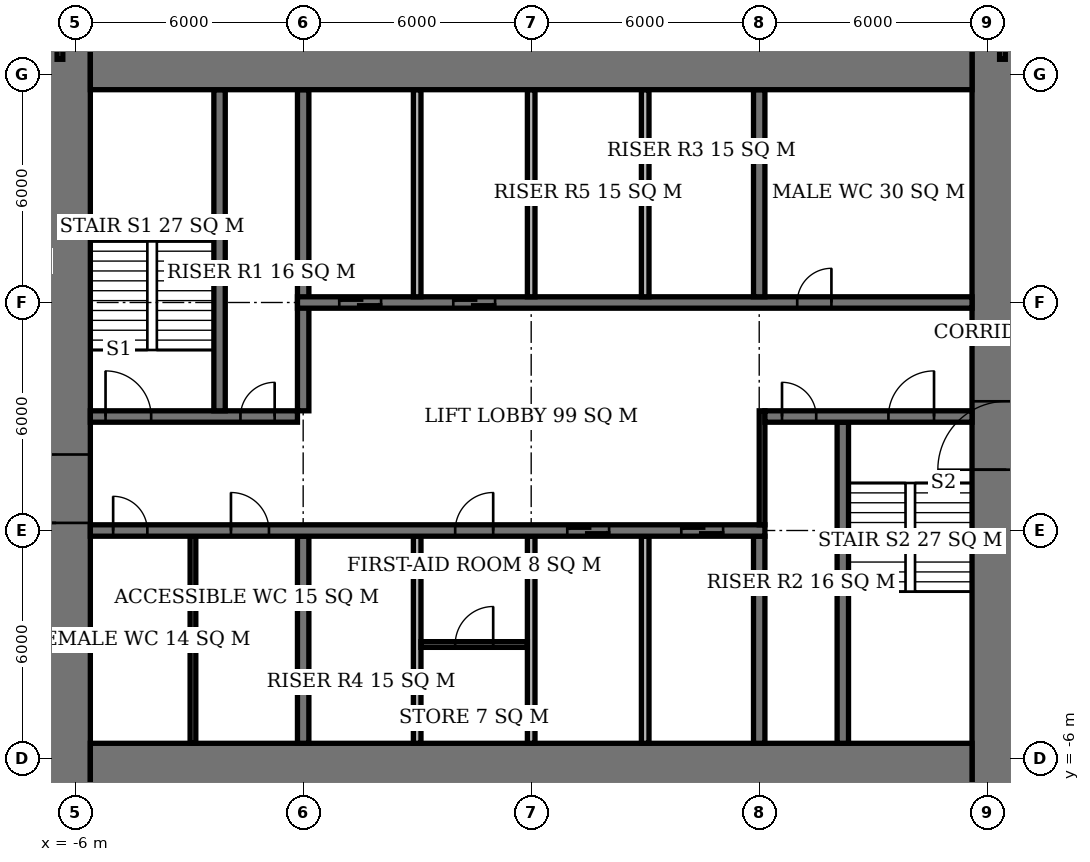
"""IFC4 building model, lengths in metres.
Left out: names, types, materials, properties, quantities, classifications, styles, units other than length and angle.
Written with IfcOpenShell. Run it as: python <this file> out.ifc"""

import sys

from ifc_helpers import new_model, si_unit, direction, frame, frame_2d, origin, place, context, subcontext, project, spatial, rectangle, extrude, element, fill, save


model = new_model("IFC4")
c1 = context("Model", 3, precision=1e-05, world=origin(), true_north=direction((0.0, 1.0)))
c2 = subcontext(c1, "Body", "Model", "MODEL_VIEW")
j1 = project(units=[si_unit("LENGTHUNIT", "METRE"), si_unit("PLANEANGLEUNIT", "RADIAN")], contexts=[c1])
p1 = place(None, origin())
s1 = spatial("IfcSite", under=j1, at=p1, CompositionType="ELEMENT")
p2 = place(p1, origin())
s2 = spatial("IfcBuilding", under=s1, at=p2, CompositionType="ELEMENT")
p3 = place(p2, frame((0.0, 0.0, 252.8)))
s3 = spatial("IfcBuildingStorey", under=s2, at=p3, CompositionType="ELEMENT", Elevation=252.8)
for number, where, z_axis, x_axis in (
    (1, (-5.6, -6.6, 0.0), (0.0, 0.0, 1.0), (1.0, 0.0, 0.0)),
    (2, (-5.6, 12.6, 0.0), (0.0, 0.0, 1.0), (1.0, 0.0, 0.0)),
):
    element("IfcWall", number, at=place(p3, frame(where, z_axis=z_axis, x_axis=x_axis)), inside=s3, PredefinedType="SHEAR", context=c2, shape_type="SweptSolid", body=[
        extrude(rectangle(XDim=23.2, YDim=2.0, at=frame_2d((11.6, 0.0))), origin(), (0.0, 0.0, 1.0), 3.9),
    ])
p4 = place(p3, frame((-6.5, -7.6, 0.0), z_axis=(0.0, 0.0, 1.0), x_axis=(0.0, 1.0, 0.0)))
e3 = element("IfcWall", 3, at=p4, inside=s3, PredefinedType="SHEAR", context=c2, shape_type="SweptSolid", body=[
    extrude(rectangle(XDim=21.2, YDim=1.8, at=frame_2d((10.6, 0.0))), origin(), (0.0, 0.0, 1.0), 3.9),
])
p5 = place(p4, frame((7.8, 0.0, 0.0)))
e4 = element("IfcOpeningElement", 4, at=p5, cuts=e3, PredefinedType="OPENING", context=c2, shape_type="SweptSolid", body=[
    extrude(rectangle(XDim=1.8, YDim=2.4, at=frame_2d((0.9, 1.2))), frame((0.0, 0.91, 0.0), z_axis=(0.0, -1.0, 0.0), x_axis=(1.0, 0.0, 0.0)), (0.0, 0.0, 1.0), 1.82),
])
p6 = place(p3, frame((18.5, -7.6, 0.0), z_axis=(0.0, 0.0, 1.0), x_axis=(0.0, 1.0, 0.0)))
e5 = element("IfcWall", 5, at=p6, inside=s3, PredefinedType="SHEAR", context=c2, shape_type="SweptSolid", body=[
    extrude(rectangle(XDim=21.2, YDim=1.8, at=frame_2d((10.6, 0.0))), origin(), (0.0, 0.0, 1.0), 3.9),
])
p7 = place(p6, frame((9.2, 0.0, 0.0)))
e6 = element("IfcOpeningElement", 6, at=p7, cuts=e5, PredefinedType="OPENING", context=c2, shape_type="SweptSolid", body=[
    extrude(rectangle(XDim=1.8, YDim=2.4, at=frame_2d((0.9, 1.2))), frame((0.0, 0.91, 0.0), z_axis=(0.0, -1.0, 0.0), x_axis=(1.0, 0.0, 0.0)), (0.0, 0.0, 1.0), 1.82),
])
p8 = place(p3, frame((-5.6, 0.0, 0.0), z_axis=(0.0, 0.0, 1.0), x_axis=(1.0, 0.0, 0.0)))
e7 = element("IfcWall", 7, at=p8, inside=s3, PredefinedType="SHEAR", context=c2, shape_type="SweptSolid", body=[
    extrude(rectangle(XDim=17.75, YDim=0.3, at=frame_2d((8.875, 0.0))), origin(), (0.0, 0.0, 1.0), 3.9),
])
p9 = place(p8, frame((0.6, 0.0, 0.0)))
e8 = element("IfcOpeningElement", 8, at=p9, cuts=e7, PredefinedType="OPENING", context=c2, shape_type="SweptSolid", body=[
    extrude(rectangle(XDim=0.9, YDim=2.1, at=frame_2d((0.45, 1.05))), frame((0.0, 0.16, 0.0), z_axis=(0.0, -1.0, 0.0), x_axis=(1.0, 0.0, 0.0)), (0.0, 0.0, 1.0), 0.32),
])
p10 = place(p8, frame((3.7, 0.0, 0.0)))
e9 = element("IfcOpeningElement", 9, at=p10, cuts=e7, PredefinedType="OPENING", context=c2, shape_type="SweptSolid", body=[
    extrude(rectangle(XDim=1.0, YDim=2.1, at=frame_2d((0.5, 1.05))), frame((0.0, 0.16, 0.0), z_axis=(0.0, -1.0, 0.0), x_axis=(1.0, 0.0, 0.0)), (0.0, 0.0, 1.0), 0.32),
])
p11 = place(p8, frame((9.6, 0.0, 0.0)))
e10 = element("IfcOpeningElement", 10, at=p11, cuts=e7, PredefinedType="OPENING", context=c2, shape_type="SweptSolid", body=[
    extrude(rectangle(XDim=1.0, YDim=2.1, at=frame_2d((0.5, 1.05))), frame((0.0, 0.16, 0.0), z_axis=(0.0, -1.0, 0.0), x_axis=(1.0, 0.0, 0.0)), (0.0, 0.0, 1.0), 0.32),
])
p12 = place(p8, frame((12.55, 0.0, 0.0)))
e11 = element("IfcOpeningElement", 11, at=p12, cuts=e7, PredefinedType="OPENING", context=c2, shape_type="SweptSolid", body=[
    extrude(rectangle(XDim=1.1, YDim=2.1, at=frame_2d((0.55, 1.05))), frame((0.0, 0.16, 0.0), z_axis=(0.0, -1.0, 0.0), x_axis=(1.0, 0.0, 0.0)), (0.0, 0.0, 1.0), 0.32),
])
p13 = place(p8, frame((15.55, 0.0, 0.0)))
e12 = element("IfcOpeningElement", 12, at=p13, cuts=e7, PredefinedType="OPENING", context=c2, shape_type="SweptSolid", body=[
    extrude(rectangle(XDim=1.1, YDim=2.1, at=frame_2d((0.55, 1.05))), frame((0.0, 0.16, 0.0), z_axis=(0.0, -1.0, 0.0), x_axis=(1.0, 0.0, 0.0)), (0.0, 0.0, 1.0), 0.32),
])
p14 = place(p3, frame((-5.6, 3.0, 0.0), z_axis=(0.0, 0.0, 1.0), x_axis=(1.0, 0.0, 0.0)))
e13 = element("IfcWall", 13, at=p14, inside=s3, PredefinedType="SHEAR", context=c2, shape_type="SweptSolid", body=[
    extrude(rectangle(XDim=5.45, YDim=0.3, at=frame_2d((2.725, 0.0))), origin(), (0.0, 0.0, 1.0), 3.9),
])
p15 = place(p14, frame((0.4, 0.0, 0.0)))
e14 = element("IfcOpeningElement", 14, at=p15, cuts=e13, PredefinedType="OPENING", context=c2, shape_type="SweptSolid", body=[
    extrude(rectangle(XDim=1.2, YDim=2.1, at=frame_2d((0.6, 1.05))), frame((0.0, 0.16, 0.0), z_axis=(0.0, -1.0, 0.0), x_axis=(1.0, 0.0, 0.0)), (0.0, 0.0, 1.0), 0.32),
])
p16 = place(p14, frame((3.95, 0.0, 0.0)))
e15 = element("IfcOpeningElement", 15, at=p16, cuts=e13, PredefinedType="OPENING", context=c2, shape_type="SweptSolid", body=[
    extrude(rectangle(XDim=0.9, YDim=2.1, at=frame_2d((0.45, 1.05))), frame((0.0, 0.16, 0.0), z_axis=(0.0, -1.0, 0.0), x_axis=(1.0, 0.0, 0.0)), (0.0, 0.0, 1.0), 0.32),
])
p17 = place(p3, frame((12.15, 3.0, 0.0), z_axis=(0.0, 0.0, 1.0), x_axis=(1.0, 0.0, 0.0)))
e16 = element("IfcWall", 16, at=p17, inside=s3, PredefinedType="SHEAR", context=c2, shape_type="SweptSolid", body=[
    extrude(rectangle(XDim=5.45, YDim=0.3, at=frame_2d((2.725, 0.0))), origin(), (0.0, 0.0, 1.0), 3.9),
])
p18 = place(p17, frame((3.25, 0.0, 0.0)))
e17 = element("IfcOpeningElement", 17, at=p18, cuts=e16, PredefinedType="OPENING", context=c2, shape_type="SweptSolid", body=[
    extrude(rectangle(XDim=1.2, YDim=2.1, at=frame_2d((0.6, 1.05))), frame((0.0, 0.16, 0.0), z_axis=(0.0, -1.0, 0.0), x_axis=(1.0, 0.0, 0.0)), (0.0, 0.0, 1.0), 0.32),
])
p19 = place(p17, frame((0.45, 0.0, 0.0)))
e18 = element("IfcOpeningElement", 18, at=p19, cuts=e16, PredefinedType="OPENING", context=c2, shape_type="SweptSolid", body=[
    extrude(rectangle(XDim=0.9, YDim=2.1, at=frame_2d((0.45, 1.05))), frame((0.0, 0.16, 0.0), z_axis=(0.0, -1.0, 0.0), x_axis=(1.0, 0.0, 0.0)), (0.0, 0.0, 1.0), 0.32),
])
p20 = place(p3, frame((-0.15, 6.0, 0.0), z_axis=(0.0, 0.0, 1.0), x_axis=(1.0, 0.0, 0.0)))
e19 = element("IfcWall", 19, at=p20, inside=s3, PredefinedType="SHEAR", context=c2, shape_type="SweptSolid", body=[
    extrude(rectangle(XDim=17.75, YDim=0.3, at=frame_2d((8.875, 0.0))), origin(), (0.0, 0.0, 1.0), 3.9),
])
p21 = place(p20, frame((13.15, 0.0, 0.0)))
e20 = element("IfcOpeningElement", 20, at=p21, cuts=e19, PredefinedType="OPENING", context=c2, shape_type="SweptSolid", body=[
    extrude(rectangle(XDim=0.9, YDim=2.1, at=frame_2d((0.45, 1.05))), frame((0.0, 0.16, 0.0), z_axis=(0.0, -1.0, 0.0), x_axis=(1.0, 0.0, 0.0)), (0.0, 0.0, 1.0), 0.32),
])
p22 = place(p20, frame((1.1, 0.0, 0.0)))
e21 = element("IfcOpeningElement", 21, at=p22, cuts=e19, PredefinedType="OPENING", context=c2, shape_type="SweptSolid", body=[
    extrude(rectangle(XDim=1.1, YDim=2.1, at=frame_2d((0.55, 1.05))), frame((0.0, 0.16, 0.0), z_axis=(0.0, -1.0, 0.0), x_axis=(1.0, 0.0, 0.0)), (0.0, 0.0, 1.0), 0.32),
])
p23 = place(p20, frame((4.1, 0.0, 0.0)))
e22 = element("IfcOpeningElement", 22, at=p23, cuts=e19, PredefinedType="OPENING", context=c2, shape_type="SweptSolid", body=[
    extrude(rectangle(XDim=1.1, YDim=2.1, at=frame_2d((0.55, 1.05))), frame((0.0, 0.16, 0.0), z_axis=(0.0, -1.0, 0.0), x_axis=(1.0, 0.0, 0.0)), (0.0, 0.0, 1.0), 0.32),
])
p24 = place(p3, frame((0.0, -5.6, 0.0), z_axis=(0.0, 0.0, 1.0), x_axis=(0.0, 1.0, 0.0)))
e23 = element("IfcWall", 23, at=p24, inside=s3, PredefinedType="SHEAR", context=c2, shape_type="SweptSolid", body=[
    extrude(rectangle(XDim=5.45, YDim=0.3, at=frame_2d((2.725, 0.0))), origin(), (0.0, 0.0, 1.0), 3.9),
])
p25 = place(p3, frame((0.0, 3.15, 0.0), z_axis=(0.0, 0.0, 1.0), x_axis=(0.0, 1.0, 0.0)))
e24 = element("IfcWall", 24, at=p25, inside=s3, PredefinedType="SHEAR", context=c2, shape_type="SweptSolid", body=[
    extrude(rectangle(XDim=8.45, YDim=0.3, at=frame_2d((4.225, 0.0))), origin(), (0.0, 0.0, 1.0), 3.9),
])
for number, where, z_axis, x_axis in (
    (25, (12.0, -5.6, 0.0), (0.0, 0.0, 1.0), (0.0, 1.0, 0.0)),
    (26, (12.0, 6.15, 0.0), (0.0, 0.0, 1.0), (0.0, 1.0, 0.0)),
):
    element("IfcWall", number, at=place(p3, frame(where, z_axis=z_axis, x_axis=x_axis)), inside=s3, PredefinedType="SHEAR", context=c2, shape_type="SweptSolid", body=[
        extrude(rectangle(XDim=5.45, YDim=0.3, at=frame_2d((2.725, 0.0))), origin(), (0.0, 0.0, 1.0), 3.9),
    ])
for number, where, z_axis, x_axis in (
    (27, (-2.2, 3.15, 0.0), (0.0, 0.0, 1.0), (0.0, 1.0, 0.0)),
    (28, (14.2, -5.6, 0.0), (0.0, 0.0, 1.0), (0.0, 1.0, 0.0)),
):
    element("IfcWall", number, at=place(p3, frame(where, z_axis=z_axis, x_axis=x_axis)), inside=s3, PredefinedType="SHEAR", context=c2, shape_type="SweptSolid", body=[
        extrude(rectangle(XDim=8.45, YDim=0.3, at=frame_2d((4.225, 0.0))), origin(), (0.0, 0.0, 1.0), 3.9),
    ])
for number, where, z_axis, x_axis in (
    (29, (3.0, 6.15, 0.0), (0.0, 0.0, 1.0), (0.0, 1.0, 0.0)),
    (30, (6.0, 6.15, 0.0), (0.0, 0.0, 1.0), (0.0, 1.0, 0.0)),
    (31, (9.0, 6.15, 0.0), (0.0, 0.0, 1.0), (0.0, 1.0, 0.0)),
    (32, (3.0, -5.6, 0.0), (0.0, 0.0, 1.0), (0.0, 1.0, 0.0)),
    (33, (6.0, -5.6, 0.0), (0.0, 0.0, 1.0), (0.0, 1.0, 0.0)),
    (34, (9.0, -5.6, 0.0), (0.0, 0.0, 1.0), (0.0, 1.0, 0.0)),
):
    element("IfcWall", number, at=place(p3, frame(where, z_axis=z_axis, x_axis=x_axis)), inside=s3, PredefinedType="SOLIDWALL", context=c2, shape_type="SweptSolid", body=[
        extrude(rectangle(XDim=5.45, YDim=0.2, at=frame_2d((2.725, 0.0))), origin(), (0.0, 0.0, 1.0), 3.9),
    ])
p26 = place(p3, frame((-2.9, -5.6, 0.0), z_axis=(0.0, 0.0, 1.0), x_axis=(0.0, 1.0, 0.0)))
e35 = element("IfcWall", 35, at=p26, inside=s3, PredefinedType="PLUMBINGWALL", context=c2, shape_type="SweptSolid", body=[
    extrude(rectangle(XDim=5.45, YDim=0.15, at=frame_2d((2.725, 0.0))), origin(), (0.0, 0.0, 1.0), 3.65),
])
p27 = place(p3, frame((3.1, -3.0, 0.0), z_axis=(0.0, 0.0, 1.0), x_axis=(1.0, 0.0, 0.0)))
e36 = element("IfcWall", 36, at=p27, inside=s3, PredefinedType="PARTITIONING", context=c2, shape_type="SweptSolid", body=[
    extrude(rectangle(XDim=2.8, YDim=0.15, at=frame_2d((1.4, 0.0))), origin(), (0.0, 0.0, 1.0), 3.65),
])
p28 = place(p27, frame((0.9, 0.0, 0.0)))
e37 = element("IfcOpeningElement", 37, at=p28, cuts=e36, PredefinedType="OPENING", context=c2, shape_type="SweptSolid", body=[
    extrude(rectangle(XDim=1.0, YDim=2.1, at=frame_2d((0.5, 1.05))), frame((0.0, 0.085, 0.0), z_axis=(0.0, -1.0, 0.0), x_axis=(1.0, 0.0, 0.0)), (0.0, 0.0, 1.0), 0.17),
])
p29 = place(p3, frame((-6.4, 12.4, 0.0), z_axis=(0.0, 0.0, 1.0), x_axis=(0.0, 1.0, 0.0)))
e38 = element("IfcWall", 38, at=p29, inside=s3, PredefinedType="PARTITIONING", context=c2, shape_type="SweptSolid", body=[
    extrude(rectangle(XDim=1.2, YDim=0.15, at=frame_2d((0.6, 0.0))), origin(), (0.0, 0.0, 1.0), 3.65),
])
p30 = place(p3, frame((13.5, 12.4, 0.0), z_axis=(0.0, 0.0, 1.0), x_axis=(0.0, 1.0, 0.0)))
e39 = element("IfcWall", 39, at=p30, inside=s3, PredefinedType="PARTITIONING", context=c2, shape_type="SweptSolid", body=[
    extrude(rectangle(XDim=12.975, YDim=0.15, at=frame_2d((6.488, 0.0))), origin(), (0.0, 0.0, 1.0), 3.65),
])
p31 = place(p3, frame((18.4, 12.4, 0.0), z_axis=(0.0, 0.0, 1.0), x_axis=(0.0, 1.0, 0.0)))
e40 = element("IfcWall", 40, at=p31, inside=s3, PredefinedType="PARTITIONING", context=c2, shape_type="SweptSolid", body=[
    extrude(rectangle(XDim=1.2, YDim=0.15, at=frame_2d((0.6, 0.0))), origin(), (0.0, 0.0, 1.0), 3.65),
])
p32 = place(p3, frame((12.075, 0.15, 0.0), z_axis=(0.0, 0.0, 1.0), x_axis=(0.0, 1.0, 0.0)))
e41 = element("IfcWall", 41, at=p32, inside=s3, PredefinedType="PARTITIONING", context=c2, shape_type="SweptSolid", body=[
    extrude(rectangle(XDim=3.0, YDim=0.15, at=frame_2d((1.5, 0.0))), origin(), (0.0, 0.0, 1.0), 3.65),
])
p33 = place(p5, origin())
e42 = element("IfcDoor", 42, at=p33, inside=s3, OperationType="DOUBLE_DOOR_SINGLE_SWING", PredefinedType="DOOR", context=c2, shape_type="SweptSolid", body=[
    extrude(rectangle(XDim=1.8, YDim=2.4, at=frame_2d((0.9, 1.2))), frame((0.0, 0.025, 0.0), z_axis=(0.0, -1.0, 0.0), x_axis=(1.0, 0.0, 0.0)), (0.0, 0.0, 1.0), 0.05),
])
fill(e4, e42)
p34 = place(p7, origin())
e43 = element("IfcDoor", 43, at=p34, inside=s3, OperationType="DOUBLE_DOOR_SINGLE_SWING", PredefinedType="DOOR", context=c2, shape_type="SweptSolid", body=[
    extrude(rectangle(XDim=1.8, YDim=2.4, at=frame_2d((0.9, 1.2))), frame((0.0, 0.025, 0.0), z_axis=(0.0, -1.0, 0.0), x_axis=(1.0, 0.0, 0.0)), (0.0, 0.0, 1.0), 0.05),
])
fill(e6, e43)
p35 = place(p15, origin())
e44 = element("IfcDoor", 44, at=p35, inside=s3, OperationType="SINGLE_SWING_LEFT", PredefinedType="DOOR", context=c2, shape_type="SweptSolid", body=[
    extrude(rectangle(XDim=1.2, YDim=2.1, at=frame_2d((0.6, 1.05))), frame((0.0, 0.025, 0.0), z_axis=(0.0, -1.0, 0.0), x_axis=(1.0, 0.0, 0.0)), (0.0, 0.0, 1.0), 0.05),
])
fill(e14, e44)
p36 = place(p16, origin())
e45 = element("IfcDoor", 45, at=p36, inside=s3, OperationType="SINGLE_SWING_RIGHT", PredefinedType="DOOR", context=c2, shape_type="SweptSolid", body=[
    extrude(rectangle(XDim=0.9, YDim=2.1, at=frame_2d((0.45, 1.05))), frame((0.0, 0.025, 0.0), z_axis=(0.0, -1.0, 0.0), x_axis=(1.0, 0.0, 0.0)), (0.0, 0.0, 1.0), 0.05),
])
fill(e15, e45)
p37 = place(p18, origin())
e46 = element("IfcDoor", 46, at=p37, inside=s3, OperationType="SINGLE_SWING_RIGHT", PredefinedType="DOOR", context=c2, shape_type="SweptSolid", body=[
    extrude(rectangle(XDim=1.2, YDim=2.1, at=frame_2d((0.6, 1.05))), frame((0.0, 0.025, 0.0), z_axis=(0.0, -1.0, 0.0), x_axis=(1.0, 0.0, 0.0)), (0.0, 0.0, 1.0), 0.05),
])
fill(e17, e46)
p38 = place(p19, origin())
e47 = element("IfcDoor", 47, at=p38, inside=s3, OperationType="SINGLE_SWING_LEFT", PredefinedType="DOOR", context=c2, shape_type="SweptSolid", body=[
    extrude(rectangle(XDim=0.9, YDim=2.1, at=frame_2d((0.45, 1.05))), frame((0.0, 0.025, 0.0), z_axis=(0.0, -1.0, 0.0), x_axis=(1.0, 0.0, 0.0)), (0.0, 0.0, 1.0), 0.05),
])
fill(e18, e47)
p39 = place(p9, origin())
e48 = element("IfcDoor", 48, at=p39, inside=s3, OperationType="SINGLE_SWING_LEFT", PredefinedType="DOOR", context=c2, shape_type="SweptSolid", body=[
    extrude(rectangle(XDim=0.9, YDim=2.1, at=frame_2d((0.45, 1.05))), frame((0.0, 0.025, 0.0), z_axis=(0.0, -1.0, 0.0), x_axis=(1.0, 0.0, 0.0)), (0.0, 0.0, 1.0), 0.05),
])
fill(e8, e48)
p40 = place(p10, origin())
e49 = element("IfcDoor", 49, at=p40, inside=s3, OperationType="SINGLE_SWING_LEFT", PredefinedType="DOOR", context=c2, shape_type="SweptSolid", body=[
    extrude(rectangle(XDim=1.0, YDim=2.1, at=frame_2d((0.5, 1.05))), frame((0.0, 0.025, 0.0), z_axis=(0.0, -1.0, 0.0), x_axis=(1.0, 0.0, 0.0)), (0.0, 0.0, 1.0), 0.05),
])
fill(e9, e49)
p41 = place(p21, origin())
e50 = element("IfcDoor", 50, at=p41, inside=s3, OperationType="SINGLE_SWING_RIGHT", PredefinedType="DOOR", context=c2, shape_type="SweptSolid", body=[
    extrude(rectangle(XDim=0.9, YDim=2.1, at=frame_2d((0.45, 1.05))), frame((0.0, 0.025, 0.0), z_axis=(0.0, -1.0, 0.0), x_axis=(1.0, 0.0, 0.0)), (0.0, 0.0, 1.0), 0.05),
])
fill(e20, e50)
p42 = place(p28, origin())
e51 = element("IfcDoor", 51, at=p42, inside=s3, OperationType="SINGLE_SWING_RIGHT", PredefinedType="DOOR", context=c2, shape_type="SweptSolid", body=[
    extrude(rectangle(XDim=1.0, YDim=2.1, at=frame_2d((0.5, 1.05))), frame((0.0, 0.025, 0.0), z_axis=(0.0, -1.0, 0.0), x_axis=(1.0, 0.0, 0.0)), (0.0, 0.0, 1.0), 0.05),
])
fill(e37, e51)
p43 = place(p11, origin())
e52 = element("IfcDoor", 52, at=p43, inside=s3, OperationType="SINGLE_SWING_RIGHT", PredefinedType="DOOR", context=c2, shape_type="SweptSolid", body=[
    extrude(rectangle(XDim=1.0, YDim=2.1, at=frame_2d((0.5, 1.05))), frame((0.0, 0.025, 0.0), z_axis=(0.0, -1.0, 0.0), x_axis=(1.0, 0.0, 0.0)), (0.0, 0.0, 1.0), 0.05),
])
fill(e10, e52)
p44 = place(p22, origin())
e53 = element("IfcDoor", 53, at=p44, inside=s3, OperationType="DOUBLE_DOOR_SLIDING", PredefinedType="USERDEFINED", context=c2, shape_type="SweptSolid", body=[
    extrude(rectangle(XDim=1.1, YDim=2.1, at=frame_2d((0.55, 1.05))), frame((0.0, 0.025, 0.0), z_axis=(0.0, -1.0, 0.0), x_axis=(1.0, 0.0, 0.0)), (0.0, 0.0, 1.0), 0.05),
])
fill(e21, e53)
p45 = place(p23, origin())
e54 = element("IfcDoor", 54, at=p45, inside=s3, OperationType="DOUBLE_DOOR_SLIDING", PredefinedType="USERDEFINED", context=c2, shape_type="SweptSolid", body=[
    extrude(rectangle(XDim=1.1, YDim=2.1, at=frame_2d((0.55, 1.05))), frame((0.0, 0.025, 0.0), z_axis=(0.0, -1.0, 0.0), x_axis=(1.0, 0.0, 0.0)), (0.0, 0.0, 1.0), 0.05),
])
fill(e22, e54)
p46 = place(p12, origin())
e55 = element("IfcDoor", 55, at=p46, inside=s3, OperationType="DOUBLE_DOOR_SLIDING", PredefinedType="USERDEFINED", context=c2, shape_type="SweptSolid", body=[
    extrude(rectangle(XDim=1.1, YDim=2.1, at=frame_2d((0.55, 1.05))), frame((0.0, 0.025, 0.0), z_axis=(0.0, -1.0, 0.0), x_axis=(1.0, 0.0, 0.0)), (0.0, 0.0, 1.0), 0.05),
])
fill(e11, e55)
p47 = place(p13, origin())
e56 = element("IfcDoor", 56, at=p47, inside=s3, OperationType="DOUBLE_DOOR_SLIDING", PredefinedType="USERDEFINED", context=c2, shape_type="SweptSolid", body=[
    extrude(rectangle(XDim=1.1, YDim=2.1, at=frame_2d((0.55, 1.05))), frame((0.0, 0.025, 0.0), z_axis=(0.0, -1.0, 0.0), x_axis=(1.0, 0.0, 0.0)), (0.0, 0.0, 1.0), 0.05),
])
fill(e12, e56)
save(model, sys.argv[1])
